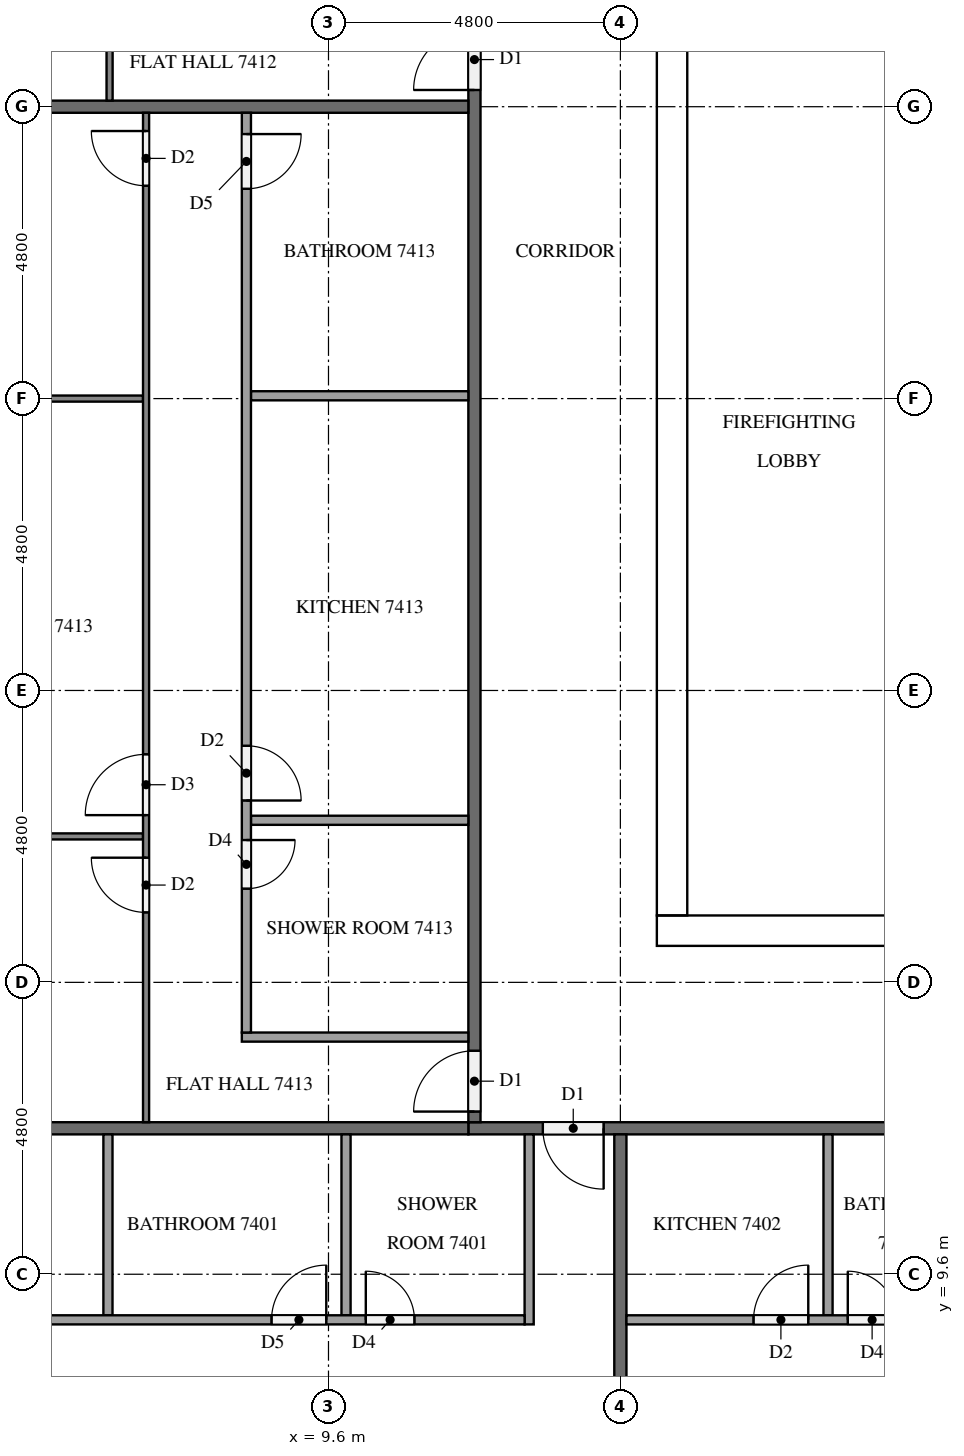
"""IFC4 building model, lengths in metres.
Left out: names, types, materials, properties, quantities, classifications, styles, units other than length and angle.
Written with IfcOpenShell. Run it as: python <this file> out.ifc"""

import sys

from ifc_helpers import new_model, si_unit, direction, frame, frame_2d, origin, place, context, subcontext, project, spatial, rectangle, extrude, element, fill, save


model = new_model("IFC4")
c1 = context("Model", 3, precision=1e-05, world=origin(), true_north=direction((0.0, 1.0)))
c2 = subcontext(c1, "Body", "Model", "MODEL_VIEW")
j1 = project(units=[si_unit("LENGTHUNIT", "METRE"), si_unit("PLANEANGLEUNIT", "RADIAN")], contexts=[c1])
p1 = place(None, origin())
s1 = spatial("IfcSite", under=j1, at=p1, CompositionType="ELEMENT")
p2 = place(p1, origin())
s2 = spatial("IfcBuilding", under=s1, at=p2, CompositionType="ELEMENT")
p3 = place(p2, frame((0.0, 0.0, 282.6)))
s3 = spatial("IfcBuildingStorey", under=s2, at=p3, CompositionType="ELEMENT", Elevation=282.6)
p4 = place(p3, frame((15.0, 15.25, 0.0), z_axis=(0.0, 0.0, 1.0), x_axis=(1.0, 0.0, 0.0)))
e1 = element("IfcWall", 1, at=p4, inside=s3, PredefinedType="SHEAR", context=c2, shape_type="SweptSolid", body=[
    extrude(rectangle(XDim=32.4, YDim=0.5, at=frame_2d((16.2, 0.0))), origin(), (0.0, 0.0, 1.0), 3.2),
])
p5 = place(p4, frame((15.3, 0.0, 0.0)))
e2 = element("IfcOpeningElement", 2, at=p5, cuts=e1, PredefinedType="OPENING", context=c2, shape_type="SweptSolid", body=[
    extrude(rectangle(XDim=1.8, YDim=2.1, at=frame_2d((0.9, 1.05))), frame((0.0, 0.26, 0.0), z_axis=(0.0, -1.0, 0.0), x_axis=(1.0, 0.0, 0.0)), (0.0, 0.0, 1.0), 0.52),
])
p6 = place(p3, frame((15.25, 15.5, 0.0), z_axis=(0.0, 0.0, 1.0), x_axis=(0.0, 1.0, 0.0)))
e3 = element("IfcWall", 3, at=p6, inside=s3, PredefinedType="SHEAR", context=c2, shape_type="SweptSolid", body=[
    extrude(rectangle(XDim=21.8, YDim=0.5, at=frame_2d((10.9, 0.0))), origin(), (0.0, 0.0, 1.0), 3.2),
])
p7 = place(p6, frame((5.26, 0.0, 0.0)))
e4 = element("IfcOpeningElement", 4, at=p7, cuts=e3, PredefinedType="OPENING", context=c2, shape_type="SweptSolid", body=[
    extrude(rectangle(XDim=1.2, YDim=2.1, at=frame_2d((0.6, 1.05))), frame((0.0, 0.26, 0.0), z_axis=(0.0, -1.0, 0.0), x_axis=(1.0, 0.0, 0.0)), (0.0, 0.0, 1.0), 0.52),
])
p8 = place(p3, frame((50.5, 12.0, 0.0), z_axis=(0.0, 0.0, 1.0), x_axis=(-1.0, 0.0, 0.0)))
e5 = element("IfcWall", 5, at=p8, inside=s3, PredefinedType="PARTITIONING", context=c2, shape_type="SweptSolid", body=[
    extrude(rectangle(XDim=38.6, YDim=0.2, at=frame_2d((19.3, 0.0))), origin(), (0.0, 0.0, 1.0), 3.2),
])
p9 = place(p8, frame((36.375, 0.0, 0.0)))
e6 = element("IfcOpeningElement", 6, at=p9, cuts=e5, PredefinedType="OPENING", context=c2, shape_type="SweptSolid", body=[
    extrude(rectangle(XDim=1.0, YDim=2.1, at=frame_2d((0.5, 1.05))), frame((0.0, 0.11, 0.0), z_axis=(0.0, -1.0, 0.0), x_axis=(1.0, 0.0, 0.0)), (0.0, 0.0, 1.0), 0.22),
])
p10 = place(p8, frame((29.175, 0.0, 0.0)))
e7 = element("IfcOpeningElement", 7, at=p10, cuts=e5, PredefinedType="OPENING", context=c2, shape_type="SweptSolid", body=[
    extrude(rectangle(XDim=1.0, YDim=2.1, at=frame_2d((0.5, 1.05))), frame((0.0, 0.11, 0.0), z_axis=(0.0, -1.0, 0.0), x_axis=(1.0, 0.0, 0.0)), (0.0, 0.0, 1.0), 0.22),
])
p11 = place(p8, frame((27.625, 0.0, 0.0)))
e8 = element("IfcOpeningElement", 8, at=p11, cuts=e5, PredefinedType="OPENING", context=c2, shape_type="SweptSolid", body=[
    extrude(rectangle(XDim=1.0, YDim=2.1, at=frame_2d((0.5, 1.05))), frame((0.0, 0.11, 0.0), z_axis=(0.0, -1.0, 0.0), x_axis=(1.0, 0.0, 0.0)), (0.0, 0.0, 1.0), 0.22),
])
p12 = place(p8, frame((2.775, 0.0, 0.0)))
e9 = element("IfcOpeningElement", 9, at=p12, cuts=e5, PredefinedType="OPENING", context=c2, shape_type="SweptSolid", body=[
    extrude(rectangle(XDim=1.0, YDim=2.1, at=frame_2d((0.5, 1.05))), frame((0.0, 0.11, 0.0), z_axis=(0.0, -1.0, 0.0), x_axis=(1.0, 0.0, 0.0)), (0.0, 0.0, 1.0), 0.22),
])
p13 = place(p8, frame((1.225, 0.0, 0.0)))
e10 = element("IfcOpeningElement", 10, at=p13, cuts=e5, PredefinedType="OPENING", context=c2, shape_type="SweptSolid", body=[
    extrude(rectangle(XDim=1.0, YDim=2.1, at=frame_2d((0.5, 1.05))), frame((0.0, 0.11, 0.0), z_axis=(0.0, -1.0, 0.0), x_axis=(1.0, 0.0, 0.0)), (0.0, 0.0, 1.0), 0.22),
])
p14 = place(p3, frame((12.0, 12.1, 0.0), z_axis=(0.0, 0.0, 1.0), x_axis=(0.0, 1.0, 0.0)))
e11 = element("IfcWall", 11, at=p14, inside=s3, PredefinedType="PARTITIONING", context=c2, shape_type="SweptSolid", body=[
    extrude(rectangle(XDim=28.6, YDim=0.2, at=frame_2d((14.3, 0.0))), origin(), (0.0, 0.0, 1.0), 3.2),
])
p15 = place(p14, frame((16.975, 0.0, 0.0)))
e12 = element("IfcOpeningElement", 12, at=p15, cuts=e11, PredefinedType="OPENING", context=c2, shape_type="SweptSolid", body=[
    extrude(rectangle(XDim=1.0, YDim=2.1, at=frame_2d((0.5, 1.05))), frame((0.0, 0.11, 0.0), z_axis=(0.0, -1.0, 0.0), x_axis=(1.0, 0.0, 0.0)), (0.0, 0.0, 1.0), 0.22),
])
p16 = place(p14, frame((0.175, 0.0, 0.0)))
e13 = element("IfcOpeningElement", 13, at=p16, cuts=e11, PredefinedType="OPENING", context=c2, shape_type="SweptSolid", body=[
    extrude(rectangle(XDim=1.0, YDim=2.1, at=frame_2d((0.5, 1.05))), frame((0.0, 0.11, 0.0), z_axis=(0.0, -1.0, 0.0), x_axis=(1.0, 0.0, 0.0)), (0.0, 0.0, 1.0), 0.22),
])
p17 = place(p3, frame((14.4, 11.9, 0.0), z_axis=(0.0, 0.0, 1.0), x_axis=(0.0, -1.0, 0.0)))
e14 = element("IfcWall", 14, at=p17, inside=s3, PredefinedType="PARTITIONING", context=c2, shape_type="SweptSolid", body=[
    extrude(rectangle(XDim=11.65, YDim=0.2, at=frame_2d((5.825, 0.0))), origin(), (0.0, 0.0, 1.0), 3.2),
])
for number, where, z_axis, x_axis in (
    (15, (0.1, 12.0, 0.0), (0.0, 0.0, 1.0), (1.0, 0.0, 0.0)),
    (16, (0.1, 28.8, 0.0), (0.0, 0.0, 1.0), (1.0, 0.0, 0.0)),
):
    element("IfcWall", number, at=place(p3, frame(where, z_axis=z_axis, x_axis=x_axis)), inside=s3, PredefinedType="PARTITIONING", context=c2, shape_type="SweptSolid", body=[
        extrude(rectangle(XDim=11.8, YDim=0.2, at=frame_2d((5.9, 0.0))), origin(), (0.0, 0.0, 1.0), 3.2),
    ])
for number, where, z_axis, x_axis in (
    (17, (9.888, 11.9, 0.0), (0.0, 0.0, 1.0), (0.0, -1.0, 0.0)),
    (18, (5.973, 11.9, 0.0), (0.0, 0.0, 1.0), (0.0, -1.0, 0.0)),
):
    element("IfcWall", number, at=place(p3, frame(where, z_axis=z_axis, x_axis=x_axis)), inside=s3, PredefinedType="PARTITIONING", context=c2, shape_type="SweptSolid", body=[
        extrude(rectangle(XDim=2.975, YDim=0.15, at=frame_2d((1.487, 0.0))), origin(), (0.0, 0.0, 1.0), 3.2),
    ])
p18 = place(p3, frame((12.9, 11.9, 0.0), z_axis=(0.0, 0.0, 1.0), x_axis=(0.0, -1.0, 0.0)))
e19 = element("IfcWall", 19, at=p18, inside=s3, PredefinedType="PARTITIONING", context=c2, shape_type="SweptSolid", body=[
    extrude(rectangle(XDim=3.125, YDim=0.15, at=frame_2d((1.562, 0.0))), origin(), (0.0, 0.0, 1.0), 3.2),
])
p19 = place(p3, frame((0.1, 8.85, 0.0), z_axis=(0.0, 0.0, 1.0), x_axis=(1.0, 0.0, 0.0)))
e20 = element("IfcWall", 20, at=p19, inside=s3, PredefinedType="PARTITIONING", context=c2, shape_type="SweptSolid", body=[
    extrude(rectangle(XDim=12.725, YDim=0.15, at=frame_2d((6.362, 0.0))), origin(), (0.0, 0.0, 1.0), 3.2),
])
p20 = place(p19, frame((10.114, 0.0, 0.0)))
e21 = element("IfcOpeningElement", 21, at=p20, cuts=e20, PredefinedType="OPENING", context=c2, shape_type="SweptSolid", body=[
    extrude(rectangle(XDim=0.8, YDim=2.1, at=frame_2d((0.4, 1.05))), frame((0.0, 0.085, 0.0), z_axis=(0.0, -1.0, 0.0), x_axis=(1.0, 0.0, 0.0)), (0.0, 0.0, 1.0), 0.17),
])
p21 = place(p19, frame((8.563, 0.0, 0.0)))
e22 = element("IfcOpeningElement", 22, at=p21, cuts=e20, PredefinedType="OPENING", context=c2, shape_type="SweptSolid", body=[
    extrude(rectangle(XDim=0.9, YDim=2.1, at=frame_2d((0.45, 1.05))), frame((0.0, 0.085, 0.0), z_axis=(0.0, -1.0, 0.0), x_axis=(1.0, 0.0, 0.0)), (0.0, 0.0, 1.0), 0.17),
])
p22 = place(p19, frame((0.35, 0.0, 0.0)))
e23 = element("IfcOpeningElement", 23, at=p22, cuts=e20, PredefinedType="OPENING", context=c2, shape_type="SweptSolid", body=[
    extrude(rectangle(XDim=0.9, YDim=2.1, at=frame_2d((0.45, 1.05))), frame((0.0, 0.085, 0.0), z_axis=(0.0, -1.0, 0.0), x_axis=(1.0, 0.0, 0.0)), (0.0, 0.0, 1.0), 0.17),
])
p23 = place(p3, frame((17.815, 11.9, 0.0), z_axis=(0.0, 0.0, 1.0), x_axis=(0.0, -1.0, 0.0)))
e24 = element("IfcWall", 24, at=p23, inside=s3, PredefinedType="PARTITIONING", context=c2, shape_type="SweptSolid", body=[
    extrude(rectangle(XDim=2.975, YDim=0.15, at=frame_2d((1.487, 0.0))), origin(), (0.0, 0.0, 1.0), 3.2),
])
p24 = place(p3, frame((14.5, 8.85, 0.0), z_axis=(0.0, 0.0, 1.0), x_axis=(1.0, 0.0, 0.0)))
e25 = element("IfcWall", 25, at=p24, inside=s3, PredefinedType="PARTITIONING", context=c2, shape_type="SweptSolid", body=[
    extrude(rectangle(XDim=5.525, YDim=0.15, at=frame_2d((2.762, 0.0))), origin(), (0.0, 0.0, 1.0), 3.2),
])
p25 = place(p24, frame((3.64, 0.0, 0.0)))
e26 = element("IfcOpeningElement", 26, at=p25, cuts=e25, PredefinedType="OPENING", context=c2, shape_type="SweptSolid", body=[
    extrude(rectangle(XDim=0.8, YDim=2.1, at=frame_2d((0.4, 1.05))), frame((0.0, 0.085, 0.0), z_axis=(0.0, -1.0, 0.0), x_axis=(1.0, 0.0, 0.0)), (0.0, 0.0, 1.0), 0.17),
])
p26 = place(p24, frame((2.09, 0.0, 0.0)))
e27 = element("IfcOpeningElement", 27, at=p26, cuts=e25, PredefinedType="OPENING", context=c2, shape_type="SweptSolid", body=[
    extrude(rectangle(XDim=0.9, YDim=2.1, at=frame_2d((0.45, 1.05))), frame((0.0, 0.085, 0.0), z_axis=(0.0, -1.0, 0.0), x_axis=(1.0, 0.0, 0.0)), (0.0, 0.0, 1.0), 0.17),
])
p27 = place(p3, frame((6.0, 28.9, 0.0), z_axis=(0.0, 0.0, 1.0), x_axis=(0.0, 1.0, 0.0)))
e28 = element("IfcWall", 28, at=p27, inside=s3, PredefinedType="PARTITIONING", context=c2, shape_type="SweptSolid", body=[
    extrude(rectangle(XDim=11.8, YDim=0.1, at=frame_2d((5.9, 0.0))), origin(), (0.0, 0.0, 1.0), 3.2),
])
p28 = place(p27, frame((5.75, 0.0, 0.0)))
e29 = element("IfcOpeningElement", 29, at=p28, cuts=e28, PredefinedType="OPENING", context=c2, shape_type="SweptSolid", body=[
    extrude(rectangle(XDim=1.0, YDim=2.1, at=frame_2d((0.5, 1.05))), frame((0.0, 0.06, 0.0), z_axis=(0.0, -1.0, 0.0), x_axis=(1.0, 0.0, 0.0)), (0.0, 0.0, 1.0), 0.12),
])
p29 = place(p27, frame((7.45, 0.0, 0.0)))
e30 = element("IfcOpeningElement", 30, at=p29, cuts=e28, PredefinedType="OPENING", context=c2, shape_type="SweptSolid", body=[
    extrude(rectangle(XDim=0.9, YDim=2.1, at=frame_2d((0.45, 1.05))), frame((0.0, 0.06, 0.0), z_axis=(0.0, -1.0, 0.0), x_axis=(1.0, 0.0, 0.0)), (0.0, 0.0, 1.0), 0.12),
])
p30 = place(p3, frame((6.55, 16.8, 0.0), z_axis=(0.0, 0.0, 1.0), x_axis=(-1.0, 0.0, 0.0)))
e31 = element("IfcWall", 31, at=p30, inside=s3, PredefinedType="PARTITIONING", context=c2, shape_type="SweptSolid", body=[
    extrude(rectangle(XDim=6.45, YDim=0.1, at=frame_2d((3.225, 0.0))), origin(), (0.0, 0.0, 1.0), 3.2),
])
p31 = place(p3, frame((6.55, 24.0, 0.0), z_axis=(0.0, 0.0, 1.0), x_axis=(-1.0, 0.0, 0.0)))
e32 = element("IfcWall", 32, at=p31, inside=s3, PredefinedType="PARTITIONING", context=c2, shape_type="SweptSolid", body=[
    extrude(rectangle(XDim=6.3, YDim=0.1, at=frame_2d((3.15, 0.0))), origin(), (0.0, 0.0, 1.0), 3.2),
])
p32 = place(p3, frame((6.6, 12.1, 0.0), z_axis=(0.0, 0.0, 1.0), x_axis=(0.0, 1.0, 0.0)))
e33 = element("IfcWall", 33, at=p32, inside=s3, PredefinedType="PARTITIONING", context=c2, shape_type="SweptSolid", body=[
    extrude(rectangle(XDim=16.6, YDim=0.1, at=frame_2d((8.3, 0.0))), origin(), (0.0, 0.0, 1.0), 3.2),
])
p33 = place(p32, frame((3.45, 0.0, 0.0)))
e34 = element("IfcOpeningElement", 34, at=p33, cuts=e33, PredefinedType="OPENING", context=c2, shape_type="SweptSolid", body=[
    extrude(rectangle(XDim=0.9, YDim=2.1, at=frame_2d((0.45, 1.05))), frame((0.0, 0.06, 0.0), z_axis=(0.0, -1.0, 0.0), x_axis=(1.0, 0.0, 0.0)), (0.0, 0.0, 1.0), 0.12),
])
p34 = place(p32, frame((5.05, 0.0, 0.0)))
e35 = element("IfcOpeningElement", 35, at=p34, cuts=e33, PredefinedType="OPENING", context=c2, shape_type="SweptSolid", body=[
    extrude(rectangle(XDim=1.0, YDim=2.1, at=frame_2d((0.5, 1.05))), frame((0.0, 0.06, 0.0), z_axis=(0.0, -1.0, 0.0), x_axis=(1.0, 0.0, 0.0)), (0.0, 0.0, 1.0), 0.12),
])
p35 = place(p32, frame((15.4, 0.0, 0.0)))
e36 = element("IfcOpeningElement", 36, at=p35, cuts=e33, PredefinedType="OPENING", context=c2, shape_type="SweptSolid", body=[
    extrude(rectangle(XDim=0.9, YDim=2.1, at=frame_2d((0.45, 1.05))), frame((0.0, 0.06, 0.0), z_axis=(0.0, -1.0, 0.0), x_axis=(1.0, 0.0, 0.0)), (0.0, 0.0, 1.0), 0.12),
])
for number, where, z_axis, x_axis in (
    (37, (11.9, 17.065, 0.0), (0.0, 0.0, 1.0), (-1.0, 0.0, 0.0)),
    (38, (11.9, 24.046, 0.0), (0.0, 0.0, 1.0), (-1.0, 0.0, 0.0)),
):
    element("IfcWall", number, at=place(p3, frame(where, z_axis=z_axis, x_axis=x_axis)), inside=s3, PredefinedType="PARTITIONING", context=c2, shape_type="SweptSolid", body=[
        extrude(rectangle(XDim=3.575, YDim=0.15, at=frame_2d((1.788, 0.0))), origin(), (0.0, 0.0, 1.0), 3.2),
    ])
p36 = place(p3, frame((11.9, 13.5, 0.0), z_axis=(0.0, 0.0, 1.0), x_axis=(-1.0, 0.0, 0.0)))
e39 = element("IfcWall", 39, at=p36, inside=s3, PredefinedType="PARTITIONING", context=c2, shape_type="SweptSolid", body=[
    extrude(rectangle(XDim=3.725, YDim=0.15, at=frame_2d((1.862, 0.0))), origin(), (0.0, 0.0, 1.0), 3.2),
])
p37 = place(p3, frame((8.25, 28.7, 0.0), z_axis=(0.0, 0.0, 1.0), x_axis=(0.0, -1.0, 0.0)))
e40 = element("IfcWall", 40, at=p37, inside=s3, PredefinedType="PARTITIONING", context=c2, shape_type="SweptSolid", body=[
    extrude(rectangle(XDim=15.125, YDim=0.15, at=frame_2d((7.562, 0.0))), origin(), (0.0, 0.0, 1.0), 3.2),
])
p38 = place(p37, frame((11.96, 0.0, 0.0)))
e41 = element("IfcOpeningElement", 41, at=p38, cuts=e40, PredefinedType="OPENING", context=c2, shape_type="SweptSolid", body=[
    extrude(rectangle(XDim=0.8, YDim=2.1, at=frame_2d((0.4, 1.05))), frame((0.0, 0.085, 0.0), z_axis=(0.0, -1.0, 0.0), x_axis=(1.0, 0.0, 0.0)), (0.0, 0.0, 1.0), 0.17),
])
p39 = place(p37, frame((10.41, 0.0, 0.0)))
e42 = element("IfcOpeningElement", 42, at=p39, cuts=e40, PredefinedType="OPENING", context=c2, shape_type="SweptSolid", body=[
    extrude(rectangle(XDim=0.9, YDim=2.1, at=frame_2d((0.45, 1.05))), frame((0.0, 0.085, 0.0), z_axis=(0.0, -1.0, 0.0), x_axis=(1.0, 0.0, 0.0)), (0.0, 0.0, 1.0), 0.17),
])
p40 = place(p37, frame((0.35, 0.0, 0.0)))
e43 = element("IfcOpeningElement", 43, at=p40, cuts=e40, PredefinedType="OPENING", context=c2, shape_type="SweptSolid", body=[
    extrude(rectangle(XDim=0.9, YDim=2.1, at=frame_2d((0.45, 1.05))), frame((0.0, 0.085, 0.0), z_axis=(0.0, -1.0, 0.0), x_axis=(1.0, 0.0, 0.0)), (0.0, 0.0, 1.0), 0.17),
])
p41 = place(p7, frame((1.2, 0.0, 0.0), z_axis=(0.0, 0.0, 1.0), x_axis=(-1.0, 0.0, 0.0)))
e44 = element("IfcDoor", 44, at=p41, inside=s3, OperationType="SINGLE_SWING_LEFT", PredefinedType="DOOR", context=c2, shape_type="SweptSolid", body=[
    extrude(rectangle(XDim=1.2, YDim=2.1, at=frame_2d((0.6, 1.05))), frame((0.0, 0.025, 0.0), z_axis=(0.0, -1.0, 0.0), x_axis=(1.0, 0.0, 0.0)), (0.0, 0.0, 1.0), 0.05),
])
fill(e4, e44)
p42 = place(p9, origin())
e45 = element("IfcDoor", 45, at=p42, inside=s3, OperationType="SINGLE_SWING_LEFT", PredefinedType="DOOR", context=c2, shape_type="SweptSolid", body=[
    extrude(rectangle(XDim=1.0, YDim=2.1, at=frame_2d((0.5, 1.05))), frame((0.0, 0.025, 0.0), z_axis=(0.0, -1.0, 0.0), x_axis=(1.0, 0.0, 0.0)), (0.0, 0.0, 1.0), 0.05),
])
fill(e6, e45)
p43 = place(p15, origin())
e46 = element("IfcDoor", 46, at=p43, inside=s3, OperationType="SINGLE_SWING_LEFT", PredefinedType="DOOR", context=c2, shape_type="SweptSolid", body=[
    extrude(rectangle(XDim=1.0, YDim=2.1, at=frame_2d((0.5, 1.05))), frame((0.0, 0.025, 0.0), z_axis=(0.0, -1.0, 0.0), x_axis=(1.0, 0.0, 0.0)), (0.0, 0.0, 1.0), 0.05),
])
fill(e12, e46)
p44 = place(p16, origin())
e47 = element("IfcDoor", 47, at=p44, inside=s3, OperationType="SINGLE_SWING_LEFT", PredefinedType="DOOR", context=c2, shape_type="SweptSolid", body=[
    extrude(rectangle(XDim=1.0, YDim=2.1, at=frame_2d((0.5, 1.05))), frame((0.0, 0.025, 0.0), z_axis=(0.0, -1.0, 0.0), x_axis=(1.0, 0.0, 0.0)), (0.0, 0.0, 1.0), 0.05),
])
fill(e13, e47)
p45 = place(p20, origin())
e48 = element("IfcDoor", 48, at=p45, inside=s3, OperationType="SINGLE_SWING_LEFT", PredefinedType="DOOR", context=c2, shape_type="SweptSolid", body=[
    extrude(rectangle(XDim=0.8, YDim=2.1, at=frame_2d((0.4, 1.05))), frame((0.0, 0.025, 0.0), z_axis=(0.0, -1.0, 0.0), x_axis=(1.0, 0.0, 0.0)), (0.0, 0.0, 1.0), 0.05),
])
fill(e21, e48)
p46 = place(p21, origin())
e49 = element("IfcDoor", 49, at=p46, inside=s3, OperationType="SINGLE_SWING_RIGHT", PredefinedType="DOOR", context=c2, shape_type="SweptSolid", body=[
    extrude(rectangle(XDim=0.9, YDim=2.1, at=frame_2d((0.45, 1.05))), frame((0.0, 0.025, 0.0), z_axis=(0.0, -1.0, 0.0), x_axis=(1.0, 0.0, 0.0)), (0.0, 0.0, 1.0), 0.05),
])
fill(e22, e49)
p47 = place(p25, origin())
e50 = element("IfcDoor", 50, at=p47, inside=s3, OperationType="SINGLE_SWING_LEFT", PredefinedType="DOOR", context=c2, shape_type="SweptSolid", body=[
    extrude(rectangle(XDim=0.8, YDim=2.1, at=frame_2d((0.4, 1.05))), frame((0.0, 0.025, 0.0), z_axis=(0.0, -1.0, 0.0), x_axis=(1.0, 0.0, 0.0)), (0.0, 0.0, 1.0), 0.05),
])
fill(e26, e50)
p48 = place(p26, origin())
e51 = element("IfcDoor", 51, at=p48, inside=s3, OperationType="SINGLE_SWING_RIGHT", PredefinedType="DOOR", context=c2, shape_type="SweptSolid", body=[
    extrude(rectangle(XDim=0.9, YDim=2.1, at=frame_2d((0.45, 1.05))), frame((0.0, 0.025, 0.0), z_axis=(0.0, -1.0, 0.0), x_axis=(1.0, 0.0, 0.0)), (0.0, 0.0, 1.0), 0.05),
])
fill(e27, e51)
p49 = place(p33, origin())
e52 = element("IfcDoor", 52, at=p49, inside=s3, OperationType="SINGLE_SWING_RIGHT", PredefinedType="DOOR", context=c2, shape_type="SweptSolid", body=[
    extrude(rectangle(XDim=0.9, YDim=2.1, at=frame_2d((0.45, 1.05))), frame((0.0, 0.025, 0.0), z_axis=(0.0, -1.0, 0.0), x_axis=(1.0, 0.0, 0.0)), (0.0, 0.0, 1.0), 0.05),
])
fill(e34, e52)
p50 = place(p34, origin())
e53 = element("IfcDoor", 53, at=p50, inside=s3, OperationType="SINGLE_SWING_LEFT", PredefinedType="DOOR", context=c2, shape_type="SweptSolid", body=[
    extrude(rectangle(XDim=1.0, YDim=2.1, at=frame_2d((0.5, 1.05))), frame((0.0, 0.025, 0.0), z_axis=(0.0, -1.0, 0.0), x_axis=(1.0, 0.0, 0.0)), (0.0, 0.0, 1.0), 0.05),
])
fill(e35, e53)
p51 = place(p35, origin())
e54 = element("IfcDoor", 54, at=p51, inside=s3, OperationType="SINGLE_SWING_RIGHT", PredefinedType="DOOR", context=c2, shape_type="SweptSolid", body=[
    extrude(rectangle(XDim=0.9, YDim=2.1, at=frame_2d((0.45, 1.05))), frame((0.0, 0.025, 0.0), z_axis=(0.0, -1.0, 0.0), x_axis=(1.0, 0.0, 0.0)), (0.0, 0.0, 1.0), 0.05),
])
fill(e36, e54)
p52 = place(p38, origin())
e55 = element("IfcDoor", 55, at=p52, inside=s3, OperationType="SINGLE_SWING_LEFT", PredefinedType="DOOR", context=c2, shape_type="SweptSolid", body=[
    extrude(rectangle(XDim=0.8, YDim=2.1, at=frame_2d((0.4, 1.05))), frame((0.0, 0.025, 0.0), z_axis=(0.0, -1.0, 0.0), x_axis=(1.0, 0.0, 0.0)), (0.0, 0.0, 1.0), 0.05),
])
fill(e41, e55)
p53 = place(p39, origin())
e56 = element("IfcDoor", 56, at=p53, inside=s3, OperationType="SINGLE_SWING_RIGHT", PredefinedType="DOOR", context=c2, shape_type="SweptSolid", body=[
    extrude(rectangle(XDim=0.9, YDim=2.1, at=frame_2d((0.45, 1.05))), frame((0.0, 0.025, 0.0), z_axis=(0.0, -1.0, 0.0), x_axis=(1.0, 0.0, 0.0)), (0.0, 0.0, 1.0), 0.05),
])
fill(e42, e56)
p54 = place(p40, origin())
e57 = element("IfcDoor", 57, at=p54, inside=s3, OperationType="SINGLE_SWING_LEFT", PredefinedType="DOOR", context=c2, shape_type="SweptSolid", body=[
    extrude(rectangle(XDim=0.9, YDim=2.1, at=frame_2d((0.45, 1.05))), frame((0.0, 0.025, 0.0), z_axis=(0.0, -1.0, 0.0), x_axis=(1.0, 0.0, 0.0)), (0.0, 0.0, 1.0), 0.05),
])
fill(e43, e57)
save(model, sys.argv[1])
